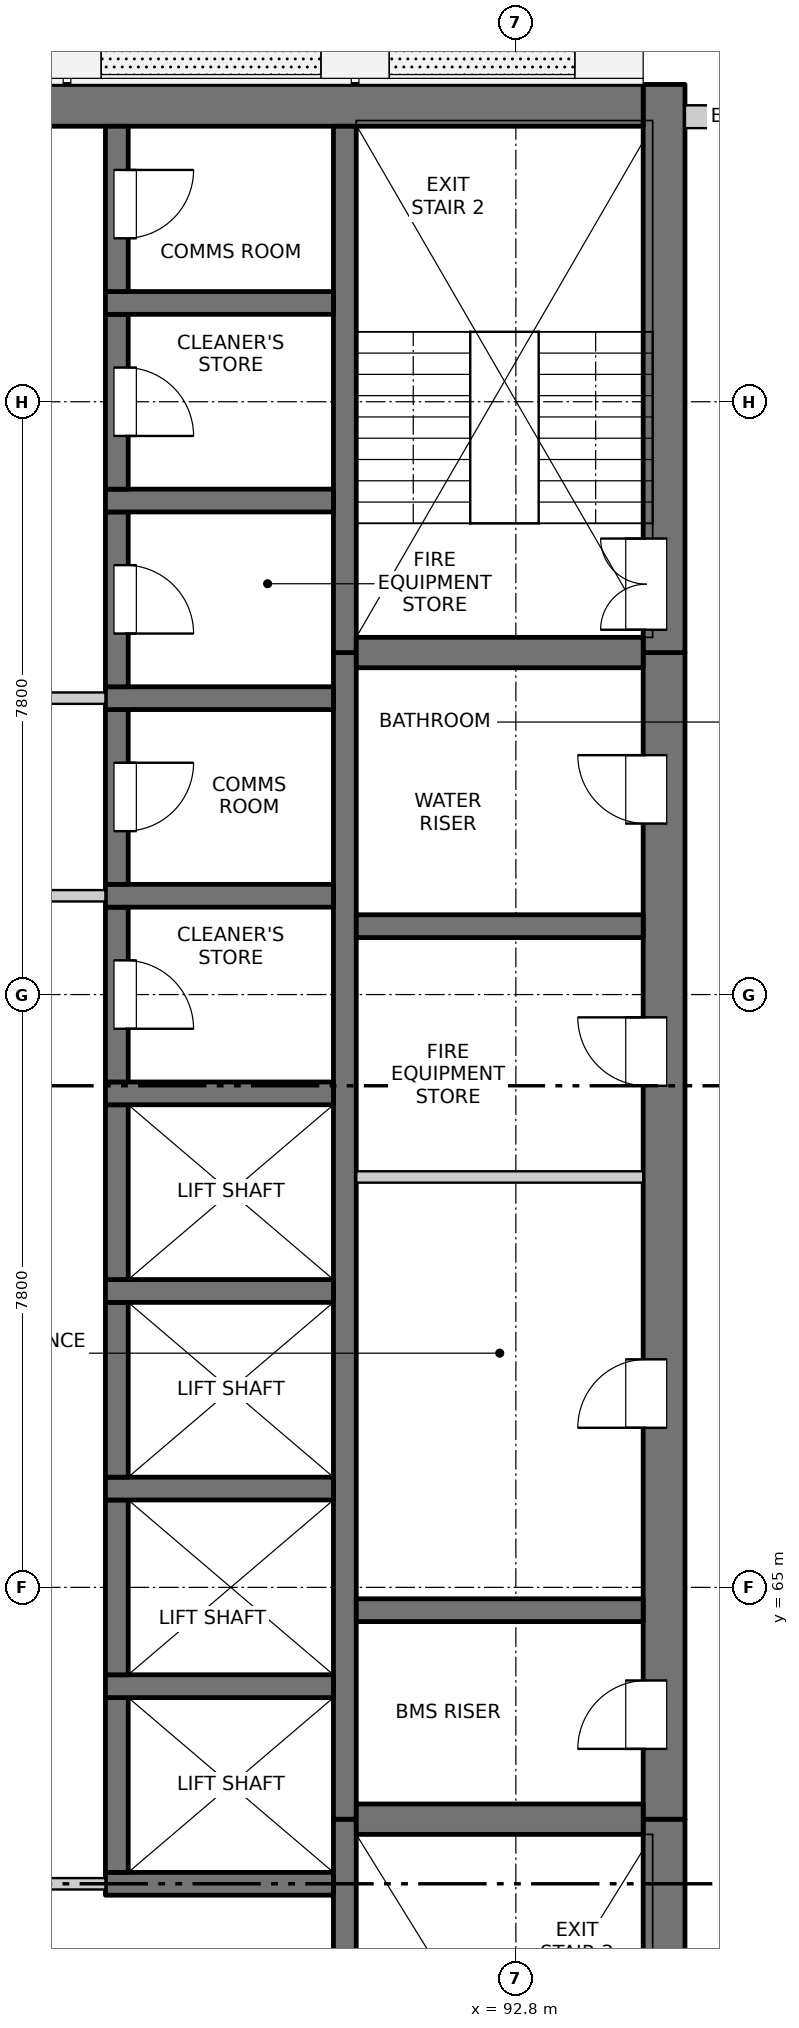
"""IFC4 building model, lengths in metres.
Left out: names, types, materials, properties, quantities, classifications, styles, units other than length and angle.
Written with IfcOpenShell. Run it as: python <this file> out.ifc"""

import sys

from ifc_helpers import new_model, si_unit, direction, frame, frame_2d, origin, place, context, subcontext, project, spatial, rectangle, extrude, element, fill, save


model = new_model("IFC4")
c1 = context("Model", 3, precision=1e-05, world=origin(), true_north=direction((0.0, 1.0)))
c2 = subcontext(c1, "Body", "Model", "MODEL_VIEW")
j1 = project(units=[si_unit("LENGTHUNIT", "METRE"), si_unit("PLANEANGLEUNIT", "RADIAN")], contexts=[c1])
p1 = place(None, origin())
s1 = spatial("IfcSite", under=j1, at=p1, CompositionType="ELEMENT")
p2 = place(p1, origin())
s2 = spatial("IfcBuilding", under=s1, at=p2, CompositionType="ELEMENT")
p3 = place(p2, frame((0.0, 0.0, 103.3)))
s3 = spatial("IfcBuildingStorey", under=s2, at=p3, CompositionType="ELEMENT", Elevation=103.3)
p4 = place(p3, frame((94.75, 54.975, -0.25), z_axis=(0.0, 0.0, 1.0), x_axis=(0.0, 1.0, 0.0)))
e1 = element("IfcWall", 1, at=p4, inside=s3, PredefinedType="SOLIDWALL", context=c2, shape_type="SweptSolid", body=[
    extrude(rectangle(XDim=6.975, YDim=0.55, at=frame_2d((3.487, 0.0))), origin(), (0.0, 0.0, 1.0), 3.4),
])
p5 = place(p4, frame((0.675, 0.0, 0.25)))
e2 = element("IfcOpeningElement", 2, at=p5, cuts=e1, PredefinedType="OPENING", context=c2, shape_type="SweptSolid", body=[
    extrude(rectangle(XDim=1.2, YDim=2.1, at=frame_2d((0.6, 1.05))), frame((0.0, 0.285, 0.0), z_axis=(0.0, -1.0, 0.0), x_axis=(1.0, 0.0, 0.0)), (0.0, 0.0, 1.0), 0.57),
])
p6 = place(p3, frame((94.75, 61.95, -0.25), z_axis=(0.0, 0.0, 1.0), x_axis=(0.0, 1.0, 0.0)))
e3 = element("IfcWall", 3, at=p6, inside=s3, PredefinedType="SOLIDWALL", context=c2, shape_type="SweptSolid", body=[
    extrude(rectangle(XDim=15.35, YDim=0.55, at=frame_2d((7.675, 0.0))), origin(), (0.0, 0.0, 1.0), 3.4),
])
p7 = place(p6, frame((0.925, 0.0, 0.25)))
e4 = element("IfcOpeningElement", 4, at=p7, cuts=e3, PredefinedType="OPENING", context=c2, shape_type="SweptSolid", body=[
    extrude(rectangle(XDim=0.9, YDim=2.1, at=frame_2d((0.45, 1.05))), frame((0.0, 0.285, 0.0), z_axis=(0.0, -1.0, 0.0), x_axis=(1.0, 0.0, 0.0)), (0.0, 0.0, 1.0), 0.57),
])
p8 = place(p6, frame((5.15, 0.0, 0.25)))
e5 = element("IfcOpeningElement", 5, at=p8, cuts=e3, PredefinedType="OPENING", context=c2, shape_type="SweptSolid", body=[
    extrude(rectangle(XDim=0.9, YDim=2.1, at=frame_2d((0.45, 1.05))), frame((0.0, 0.285, 0.0), z_axis=(0.0, -1.0, 0.0), x_axis=(1.0, 0.0, 0.0)), (0.0, 0.0, 1.0), 0.57),
])
p9 = place(p6, frame((9.65, 0.0, 0.25)))
e6 = element("IfcOpeningElement", 6, at=p9, cuts=e3, PredefinedType="OPENING", context=c2, shape_type="SweptSolid", body=[
    extrude(rectangle(XDim=0.9, YDim=2.1, at=frame_2d((0.45, 1.05))), frame((0.0, 0.285, 0.0), z_axis=(0.0, -1.0, 0.0), x_axis=(1.0, 0.0, 0.0)), (0.0, 0.0, 1.0), 0.57),
])
p10 = place(p6, frame((13.1, 0.0, 0.25)))
e7 = element("IfcOpeningElement", 7, at=p10, cuts=e3, PredefinedType="OPENING", context=c2, shape_type="SweptSolid", body=[
    extrude(rectangle(XDim=0.9, YDim=2.1, at=frame_2d((0.45, 1.05))), frame((0.0, 0.285, 0.0), z_axis=(0.0, -1.0, 0.0), x_axis=(1.0, 0.0, 0.0)), (0.0, 0.0, 1.0), 0.57),
])
p11 = place(p3, frame((94.75, 77.3, -0.25), z_axis=(0.0, 0.0, 1.0), x_axis=(0.0, 1.0, 0.0)))
e8 = element("IfcWall", 8, at=p11, inside=s3, PredefinedType="SOLIDWALL", context=c2, shape_type="SweptSolid", body=[
    extrude(rectangle(XDim=7.475, YDim=0.55, at=frame_2d((3.737, 0.0))), origin(), (0.0, 0.0, 1.0), 3.4),
])
p12 = place(p11, frame((0.3, 0.0, 0.25)))
e9 = element("IfcOpeningElement", 9, at=p12, cuts=e8, PredefinedType="OPENING", context=c2, shape_type="SweptSolid", body=[
    extrude(rectangle(XDim=1.2, YDim=2.1, at=frame_2d((0.6, 1.05))), frame((0.0, 0.285, 0.0), z_axis=(0.0, -1.0, 0.0), x_axis=(1.0, 0.0, 0.0)), (0.0, 0.0, 1.0), 0.57),
])
p13 = place(p3, frame((75.525, 84.5, -0.25), z_axis=(0.0, 0.0, 1.0), x_axis=(1.0, 0.0, 0.0)))
e10 = element("IfcWall", 10, at=p13, inside=s3, PredefinedType="SOLIDWALL", context=c2, shape_type="SweptSolid", body=[
    extrude(rectangle(XDim=18.95, YDim=0.55, at=frame_2d((9.475, 0.0))), origin(), (0.0, 0.0, 1.0), 3.4),
])
p14 = place(p3, frame((90.55, 55.525, -0.25), z_axis=(0.0, 0.0, 1.0), x_axis=(0.0, 1.0, 0.0)))
e11 = element("IfcWall", 11, at=p14, inside=s3, PredefinedType="SOLIDWALL", context=c2, shape_type="SweptSolid", body=[
    extrude(rectangle(XDim=6.425, YDim=0.3, at=frame_2d((3.212, 0.0))), origin(), (0.0, 0.0, 1.0), 3.4),
])
p15 = place(p14, frame((0.125, 0.0, 0.25)))
e12 = element("IfcOpeningElement", 12, at=p15, cuts=e11, PredefinedType="OPENING", context=c2, shape_type="SweptSolid", body=[
    extrude(rectangle(XDim=1.2, YDim=2.1, at=frame_2d((0.6, 1.05))), frame((0.0, 0.16, 0.0), z_axis=(0.0, -1.0, 0.0), x_axis=(1.0, 0.0, 0.0)), (0.0, 0.0, 1.0), 0.32),
])
p16 = place(p3, frame((90.55, 61.95, -0.25), z_axis=(0.0, 0.0, 1.0), x_axis=(0.0, 1.0, 0.0)))
e13 = element("IfcWall", 13, at=p16, inside=s3, PredefinedType="SOLIDWALL", context=c2, shape_type="SweptSolid", body=[
    extrude(rectangle(XDim=15.35, YDim=0.3, at=frame_2d((7.675, 0.0))), origin(), (0.0, 0.0, 1.0), 3.4),
])
p17 = place(p3, frame((90.55, 77.3, -0.25), z_axis=(0.0, 0.0, 1.0), x_axis=(0.0, 1.0, 0.0)))
e14 = element("IfcWall", 14, at=p17, inside=s3, PredefinedType="SOLIDWALL", context=c2, shape_type="SweptSolid", body=[
    extrude(rectangle(XDim=6.925, YDim=0.3, at=frame_2d((3.462, 0.0))), origin(), (0.0, 0.0, 1.0), 3.4),
])
p18 = place(p3, frame((87.4, 61.1, -0.25), z_axis=(0.0, 0.0, 1.0), x_axis=(1.0, 0.0, 0.0)))
e15 = element("IfcWall", 15, at=p18, inside=s3, PredefinedType="SOLIDWALL", context=c2, shape_type="SweptSolid", body=[
    extrude(rectangle(XDim=3.0, YDim=0.3, at=frame_2d((1.5, 0.0))), origin(), (0.0, 0.0, 1.0), 3.4),
])
p19 = place(p3, frame((87.55, 61.25, -0.25), z_axis=(0.0, 0.0, 1.0), x_axis=(0.0, 1.0, 0.0)))
e16 = element("IfcWall", 16, at=p19, inside=s3, PredefinedType="SOLIDWALL", context=c2, shape_type="SweptSolid", body=[
    extrude(rectangle(XDim=2.3, YDim=0.3, at=frame_2d((1.15, 0.0))), origin(), (0.0, 0.0, 1.0), 3.4),
])
p20 = place(p3, frame((87.4, 63.7, -0.25), z_axis=(0.0, 0.0, 1.0), x_axis=(1.0, 0.0, 0.0)))
e17 = element("IfcWall", 17, at=p20, inside=s3, PredefinedType="SOLIDWALL", context=c2, shape_type="SweptSolid", body=[
    extrude(rectangle(XDim=3.0, YDim=0.3, at=frame_2d((1.5, 0.0))), origin(), (0.0, 0.0, 1.0), 3.4),
])
p21 = place(p3, frame((87.55, 63.85, -0.25), z_axis=(0.0, 0.0, 1.0), x_axis=(0.0, 1.0, 0.0)))
e18 = element("IfcWall", 18, at=p21, inside=s3, PredefinedType="SOLIDWALL", context=c2, shape_type="SweptSolid", body=[
    extrude(rectangle(XDim=2.3, YDim=0.3, at=frame_2d((1.15, 0.0))), origin(), (0.0, 0.0, 1.0), 3.4),
])
p22 = place(p3, frame((87.4, 66.3, -0.25), z_axis=(0.0, 0.0, 1.0), x_axis=(1.0, 0.0, 0.0)))
e19 = element("IfcWall", 19, at=p22, inside=s3, PredefinedType="SOLIDWALL", context=c2, shape_type="SweptSolid", body=[
    extrude(rectangle(XDim=3.0, YDim=0.3, at=frame_2d((1.5, 0.0))), origin(), (0.0, 0.0, 1.0), 3.4),
])
p23 = place(p3, frame((87.55, 66.45, -0.25), z_axis=(0.0, 0.0, 1.0), x_axis=(0.0, 1.0, 0.0)))
e20 = element("IfcWall", 20, at=p23, inside=s3, PredefinedType="SOLIDWALL", context=c2, shape_type="SweptSolid", body=[
    extrude(rectangle(XDim=2.3, YDim=0.3, at=frame_2d((1.15, 0.0))), origin(), (0.0, 0.0, 1.0), 3.4),
])
p24 = place(p3, frame((87.4, 68.9, -0.25), z_axis=(0.0, 0.0, 1.0), x_axis=(1.0, 0.0, 0.0)))
e21 = element("IfcWall", 21, at=p24, inside=s3, PredefinedType="SOLIDWALL", context=c2, shape_type="SweptSolid", body=[
    extrude(rectangle(XDim=3.0, YDim=0.3, at=frame_2d((1.5, 0.0))), origin(), (0.0, 0.0, 1.0), 3.4),
])
p25 = place(p3, frame((87.55, 69.05, -0.25), z_axis=(0.0, 0.0, 1.0), x_axis=(0.0, 1.0, 0.0)))
e22 = element("IfcWall", 22, at=p25, inside=s3, PredefinedType="SOLIDWALL", context=c2, shape_type="SweptSolid", body=[
    extrude(rectangle(XDim=2.3, YDim=0.3, at=frame_2d((1.15, 0.0))), origin(), (0.0, 0.0, 1.0), 3.4),
])
p26 = place(p3, frame((87.4, 71.5, -0.25), z_axis=(0.0, 0.0, 1.0), x_axis=(1.0, 0.0, 0.0)))
e23 = element("IfcWall", 23, at=p26, inside=s3, PredefinedType="SOLIDWALL", context=c2, shape_type="SweptSolid", body=[
    extrude(rectangle(XDim=3.0, YDim=0.3, at=frame_2d((1.5, 0.0))), origin(), (0.0, 0.0, 1.0), 3.4),
])
p27 = place(p3, frame((87.55, 71.65, -0.25), z_axis=(0.0, 0.0, 1.0), x_axis=(0.0, 1.0, 0.0)))
e24 = element("IfcWall", 24, at=p27, inside=s3, PredefinedType="SOLIDWALL", context=c2, shape_type="SweptSolid", body=[
    extrude(rectangle(XDim=2.3, YDim=0.3, at=frame_2d((1.15, 0.0))), origin(), (0.0, 0.0, 1.0), 3.4),
])
p28 = place(p27, frame((0.7, 0.0, 0.25)))
e25 = element("IfcOpeningElement", 25, at=p28, cuts=e24, PredefinedType="OPENING", context=c2, shape_type="SweptSolid", body=[
    extrude(rectangle(XDim=0.9, YDim=2.1, at=frame_2d((0.45, 1.05))), frame((0.0, 0.16, 0.0), z_axis=(0.0, -1.0, 0.0), x_axis=(1.0, 0.0, 0.0)), (0.0, 0.0, 1.0), 0.32),
])
p29 = place(p3, frame((87.4, 74.1, -0.25), z_axis=(0.0, 0.0, 1.0), x_axis=(1.0, 0.0, 0.0)))
e26 = element("IfcWall", 26, at=p29, inside=s3, PredefinedType="SOLIDWALL", context=c2, shape_type="SweptSolid", body=[
    extrude(rectangle(XDim=3.0, YDim=0.3, at=frame_2d((1.5, 0.0))), origin(), (0.0, 0.0, 1.0), 3.4),
])
p30 = place(p3, frame((87.55, 74.25, -0.25), z_axis=(0.0, 0.0, 1.0), x_axis=(0.0, 1.0, 0.0)))
e27 = element("IfcWall", 27, at=p30, inside=s3, PredefinedType="SOLIDWALL", context=c2, shape_type="SweptSolid", body=[
    extrude(rectangle(XDim=2.3, YDim=0.3, at=frame_2d((1.15, 0.0))), origin(), (0.0, 0.0, 1.0), 3.4),
])
p31 = place(p30, frame((0.7, 0.0, 0.25)))
e28 = element("IfcOpeningElement", 28, at=p31, cuts=e27, PredefinedType="OPENING", context=c2, shape_type="SweptSolid", body=[
    extrude(rectangle(XDim=0.9, YDim=2.1, at=frame_2d((0.45, 1.05))), frame((0.0, 0.16, 0.0), z_axis=(0.0, -1.0, 0.0), x_axis=(1.0, 0.0, 0.0)), (0.0, 0.0, 1.0), 0.32),
])
p32 = place(p3, frame((87.4, 76.7, -0.25), z_axis=(0.0, 0.0, 1.0), x_axis=(1.0, 0.0, 0.0)))
e29 = element("IfcWall", 29, at=p32, inside=s3, PredefinedType="SOLIDWALL", context=c2, shape_type="SweptSolid", body=[
    extrude(rectangle(XDim=3.0, YDim=0.3, at=frame_2d((1.5, 0.0))), origin(), (0.0, 0.0, 1.0), 3.4),
])
p33 = place(p3, frame((87.55, 76.85, -0.25), z_axis=(0.0, 0.0, 1.0), x_axis=(0.0, 1.0, 0.0)))
e30 = element("IfcWall", 30, at=p33, inside=s3, PredefinedType="SOLIDWALL", context=c2, shape_type="SweptSolid", body=[
    extrude(rectangle(XDim=2.3, YDim=0.3, at=frame_2d((1.15, 0.0))), origin(), (0.0, 0.0, 1.0), 3.4),
])
p34 = place(p33, frame((0.7, 0.0, 0.25)))
e31 = element("IfcOpeningElement", 31, at=p34, cuts=e30, PredefinedType="OPENING", context=c2, shape_type="SweptSolid", body=[
    extrude(rectangle(XDim=0.9, YDim=2.1, at=frame_2d((0.45, 1.05))), frame((0.0, 0.16, 0.0), z_axis=(0.0, -1.0, 0.0), x_axis=(1.0, 0.0, 0.0)), (0.0, 0.0, 1.0), 0.32),
])
p35 = place(p3, frame((87.4, 79.3, -0.25), z_axis=(0.0, 0.0, 1.0), x_axis=(1.0, 0.0, 0.0)))
e32 = element("IfcWall", 32, at=p35, inside=s3, PredefinedType="SOLIDWALL", context=c2, shape_type="SweptSolid", body=[
    extrude(rectangle(XDim=3.0, YDim=0.3, at=frame_2d((1.5, 0.0))), origin(), (0.0, 0.0, 1.0), 3.4),
])
p36 = place(p3, frame((87.55, 79.45, -0.25), z_axis=(0.0, 0.0, 1.0), x_axis=(0.0, 1.0, 0.0)))
e33 = element("IfcWall", 33, at=p36, inside=s3, PredefinedType="SOLIDWALL", context=c2, shape_type="SweptSolid", body=[
    extrude(rectangle(XDim=2.3, YDim=0.3, at=frame_2d((1.15, 0.0))), origin(), (0.0, 0.0, 1.0), 3.4),
])
p37 = place(p36, frame((0.7, 0.0, 0.25)))
e34 = element("IfcOpeningElement", 34, at=p37, cuts=e33, PredefinedType="OPENING", context=c2, shape_type="SweptSolid", body=[
    extrude(rectangle(XDim=0.9, YDim=2.1, at=frame_2d((0.45, 1.05))), frame((0.0, 0.16, 0.0), z_axis=(0.0, -1.0, 0.0), x_axis=(1.0, 0.0, 0.0)), (0.0, 0.0, 1.0), 0.32),
])
p38 = place(p3, frame((87.4, 81.9, -0.25), z_axis=(0.0, 0.0, 1.0), x_axis=(1.0, 0.0, 0.0)))
e35 = element("IfcWall", 35, at=p38, inside=s3, PredefinedType="SOLIDWALL", context=c2, shape_type="SweptSolid", body=[
    extrude(rectangle(XDim=3.0, YDim=0.3, at=frame_2d((1.5, 0.0))), origin(), (0.0, 0.0, 1.0), 3.4),
])
p39 = place(p3, frame((87.55, 82.05, -0.25), z_axis=(0.0, 0.0, 1.0), x_axis=(0.0, 1.0, 0.0)))
e36 = element("IfcWall", 36, at=p39, inside=s3, PredefinedType="SOLIDWALL", context=c2, shape_type="SweptSolid", body=[
    extrude(rectangle(XDim=2.175, YDim=0.3, at=frame_2d((1.087, 0.0))), origin(), (0.0, 0.0, 1.0), 3.4),
])
p40 = place(p39, frame((0.7, 0.0, 0.25)))
e37 = element("IfcOpeningElement", 37, at=p40, cuts=e36, PredefinedType="OPENING", context=c2, shape_type="SweptSolid", body=[
    extrude(rectangle(XDim=0.9, YDim=2.1, at=frame_2d((0.45, 1.05))), frame((0.0, 0.16, 0.0), z_axis=(0.0, -1.0, 0.0), x_axis=(1.0, 0.0, 0.0)), (0.0, 0.0, 1.0), 0.32),
])
p41 = place(p3, frame((90.7, 61.95, -0.25), z_axis=(0.0, 0.0, 1.0), x_axis=(1.0, 0.0, 0.0)))
e38 = element("IfcWall", 38, at=p41, inside=s3, PredefinedType="SOLIDWALL", context=c2, shape_type="SweptSolid", body=[
    extrude(rectangle(XDim=3.775, YDim=0.4, at=frame_2d((1.888, 0.0))), origin(), (0.0, 0.0, 1.0), 3.4),
])
for number, where, z_axis, x_axis in (
    (39, (90.7, 64.7, -0.25), (0.0, 0.0, 1.0), (1.0, 0.0, 0.0)),
    (40, (90.7, 73.7, -0.25), (0.0, 0.0, 1.0), (1.0, 0.0, 0.0)),
):
    element("IfcWall", number, at=place(p3, frame(where, z_axis=z_axis, x_axis=x_axis)), inside=s3, PredefinedType="SOLIDWALL", context=c2, shape_type="SweptSolid", body=[
        extrude(rectangle(XDim=3.775, YDim=0.3, at=frame_2d((1.888, 0.0))), origin(), (0.0, 0.0, 1.0), 3.4),
    ])
p42 = place(p3, frame((90.7, 77.3, -0.25), z_axis=(0.0, 0.0, 1.0), x_axis=(1.0, 0.0, 0.0)))
e41 = element("IfcWall", 41, at=p42, inside=s3, PredefinedType="SOLIDWALL", context=c2, shape_type="SweptSolid", body=[
    extrude(rectangle(XDim=3.775, YDim=0.4, at=frame_2d((1.888, 0.0))), origin(), (0.0, 0.0, 1.0), 3.4),
])
p43 = place(p3, frame((95.025, 84.35, 0.0), z_axis=(0.0, 0.0, 1.0), x_axis=(1.0, 0.0, 0.0)))
e42 = element("IfcWall", 42, at=p43, inside=s3, PredefinedType="SOLIDWALL", context=c2, shape_type="SweptSolid", body=[
    extrude(rectangle(XDim=1.25, YDim=0.3, at=frame_2d((0.625, 0.0))), origin(), (0.0, 0.0, 1.0), 2.7),
])
p44 = place(p3, frame((82.6, 61.1, 0.0), z_axis=(0.0, 0.0, 1.0), x_axis=(1.0, 0.0, 0.0)))
e43 = element("IfcWall", 43, at=p44, inside=s3, PredefinedType="PARTITIONING", context=c2, shape_type="SweptSolid", body=[
    extrude(rectangle(XDim=4.8, YDim=0.15, at=frame_2d((2.4, 0.0))), origin(), (0.0, 0.0, 1.0), 3.15),
])
p45 = place(p44, frame((1.5, 0.0, 0.0)))
e44 = element("IfcOpeningElement", 44, at=p45, cuts=e43, PredefinedType="OPENING", context=c2, shape_type="SweptSolid", body=[
    extrude(rectangle(XDim=1.8, YDim=2.1, at=frame_2d((0.9, 1.05))), frame((0.0, 0.085, 0.0), z_axis=(0.0, -1.0, 0.0), x_axis=(1.0, 0.0, 0.0)), (0.0, 0.0, 1.0), 0.17),
])
p46 = place(p3, frame((90.7, 70.4, 0.0), z_axis=(0.0, 0.0, 1.0), x_axis=(1.0, 0.0, 0.0)))
e45 = element("IfcWall", 45, at=p46, inside=s3, PredefinedType="PARTITIONING", context=c2, shape_type="SweptSolid", body=[
    extrude(rectangle(XDim=3.775, YDim=0.15, at=frame_2d((1.887, 0.0))), origin(), (0.0, 0.0, 1.0), 3.15),
])
p47 = place(p3, frame((82.6, 74.1, 0.0), z_axis=(0.0, 0.0, 1.0), x_axis=(1.0, 0.0, 0.0)))
e46 = element("IfcWall", 46, at=p47, inside=s3, PredefinedType="PARTITIONING", context=c2, shape_type="SweptSolid", body=[
    extrude(rectangle(XDim=4.8, YDim=0.15, at=frame_2d((2.4, 0.0))), origin(), (0.0, 0.0, 1.0), 3.15),
])
p48 = place(p47, frame((1.5, 0.0, 0.0)))
e47 = element("IfcOpeningElement", 47, at=p48, cuts=e46, PredefinedType="OPENING", context=c2, shape_type="SweptSolid", body=[
    extrude(rectangle(XDim=1.8, YDim=2.1, at=frame_2d((0.9, 1.05))), frame((0.0, 0.085, 0.0), z_axis=(0.0, -1.0, 0.0), x_axis=(1.0, 0.0, 0.0)), (0.0, 0.0, 1.0), 0.17),
])
p49 = place(p3, frame((82.6, 76.7, 0.0), z_axis=(0.0, 0.0, 1.0), x_axis=(1.0, 0.0, 0.0)))
e48 = element("IfcWall", 48, at=p49, inside=s3, PredefinedType="PARTITIONING", context=c2, shape_type="SweptSolid", body=[
    extrude(rectangle(XDim=4.8, YDim=0.15, at=frame_2d((2.4, 0.0))), origin(), (0.0, 0.0, 1.0), 3.15),
])
p50 = place(p49, frame((1.5, 0.0, 0.0)))
e49 = element("IfcOpeningElement", 49, at=p50, cuts=e48, PredefinedType="OPENING", context=c2, shape_type="SweptSolid", body=[
    extrude(rectangle(XDim=1.8, YDim=2.1, at=frame_2d((0.9, 1.05))), frame((0.0, 0.085, 0.0), z_axis=(0.0, -1.0, 0.0), x_axis=(1.0, 0.0, 0.0)), (0.0, 0.0, 1.0), 0.17),
])
p51 = place(p7, origin())
e50 = element("IfcDoor", 50, at=p51, inside=s3, OperationType="SINGLE_SWING_LEFT", PredefinedType="DOOR", context=c2, shape_type="SweptSolid", body=[
    extrude(rectangle(XDim=0.9, YDim=2.1, at=frame_2d((0.45, 1.05))), frame((0.0, 0.26, 0.0), z_axis=(0.0, -1.0, 0.0), x_axis=(1.0, 0.0, 0.0)), (0.0, 0.0, 1.0), 0.05),
])
fill(e4, e50)
p52 = place(p8, origin())
e51 = element("IfcDoor", 51, at=p52, inside=s3, OperationType="SINGLE_SWING_LEFT", PredefinedType="DOOR", context=c2, shape_type="SweptSolid", body=[
    extrude(rectangle(XDim=0.9, YDim=2.1, at=frame_2d((0.45, 1.05))), frame((0.0, 0.26, 0.0), z_axis=(0.0, -1.0, 0.0), x_axis=(1.0, 0.0, 0.0)), (0.0, 0.0, 1.0), 0.05),
])
fill(e5, e51)
p53 = place(p9, origin())
e52 = element("IfcDoor", 52, at=p53, inside=s3, OperationType="SINGLE_SWING_RIGHT", PredefinedType="DOOR", context=c2, shape_type="SweptSolid", body=[
    extrude(rectangle(XDim=0.9, YDim=2.1, at=frame_2d((0.45, 1.05))), frame((0.0, 0.26, 0.0), z_axis=(0.0, -1.0, 0.0), x_axis=(1.0, 0.0, 0.0)), (0.0, 0.0, 1.0), 0.05),
])
fill(e6, e52)
p54 = place(p28, origin())
e53 = element("IfcDoor", 53, at=p54, inside=s3, OperationType="SINGLE_SWING_RIGHT", PredefinedType="DOOR", context=c2, shape_type="SweptSolid", body=[
    extrude(rectangle(XDim=0.9, YDim=2.1, at=frame_2d((0.45, 1.05))), frame((0.0, -0.085, 0.0), z_axis=(0.0, -1.0, 0.0), x_axis=(1.0, 0.0, 0.0)), (0.0, 0.0, 1.0), 0.05),
])
fill(e25, e53)
p55 = place(p31, origin())
e54 = element("IfcDoor", 54, at=p55, inside=s3, OperationType="SINGLE_SWING_LEFT", PredefinedType="DOOR", context=c2, shape_type="SweptSolid", body=[
    extrude(rectangle(XDim=0.9, YDim=2.1, at=frame_2d((0.45, 1.05))), frame((0.0, -0.085, 0.0), z_axis=(0.0, -1.0, 0.0), x_axis=(1.0, 0.0, 0.0)), (0.0, 0.0, 1.0), 0.05),
])
fill(e28, e54)
p56 = place(p10, origin())
e55 = element("IfcDoor", 55, at=p56, inside=s3, OperationType="SINGLE_SWING_RIGHT", PredefinedType="DOOR", context=c2, shape_type="SweptSolid", body=[
    extrude(rectangle(XDim=0.9, YDim=2.1, at=frame_2d((0.45, 1.05))), frame((0.0, 0.26, 0.0), z_axis=(0.0, -1.0, 0.0), x_axis=(1.0, 0.0, 0.0)), (0.0, 0.0, 1.0), 0.05),
])
fill(e7, e55)
p57 = place(p34, origin())
e56 = element("IfcDoor", 56, at=p57, inside=s3, OperationType="SINGLE_SWING_RIGHT", PredefinedType="DOOR", context=c2, shape_type="SweptSolid", body=[
    extrude(rectangle(XDim=0.9, YDim=2.1, at=frame_2d((0.45, 1.05))), frame((0.0, -0.085, 0.0), z_axis=(0.0, -1.0, 0.0), x_axis=(1.0, 0.0, 0.0)), (0.0, 0.0, 1.0), 0.05),
])
fill(e31, e56)
p58 = place(p12, origin())
e57 = element("IfcDoor", 57, at=p58, inside=s3, OperationType="DOUBLE_DOOR_SINGLE_SWING", PredefinedType="DOOR", context=c2, shape_type="SweptSolid", body=[
    extrude(rectangle(XDim=1.2, YDim=2.1, at=frame_2d((0.6, 1.05))), frame((0.0, 0.26, 0.0), z_axis=(0.0, -1.0, 0.0), x_axis=(1.0, 0.0, 0.0)), (0.0, 0.0, 1.0), 0.05),
])
fill(e9, e57)
p59 = place(p37, origin())
e58 = element("IfcDoor", 58, at=p59, inside=s3, OperationType="SINGLE_SWING_RIGHT", PredefinedType="DOOR", context=c2, shape_type="SweptSolid", body=[
    extrude(rectangle(XDim=0.9, YDim=2.1, at=frame_2d((0.45, 1.05))), frame((0.0, -0.085, 0.0), z_axis=(0.0, -1.0, 0.0), x_axis=(1.0, 0.0, 0.0)), (0.0, 0.0, 1.0), 0.05),
])
fill(e34, e58)
p60 = place(p40, origin())
e59 = element("IfcDoor", 59, at=p60, inside=s3, OperationType="SINGLE_SWING_LEFT", PredefinedType="DOOR", context=c2, shape_type="SweptSolid", body=[
    extrude(rectangle(XDim=0.9, YDim=2.1, at=frame_2d((0.45, 1.05))), frame((0.0, -0.085, 0.0), z_axis=(0.0, -1.0, 0.0), x_axis=(1.0, 0.0, 0.0)), (0.0, 0.0, 1.0), 0.05),
])
fill(e37, e59)
save(model, sys.argv[1])
